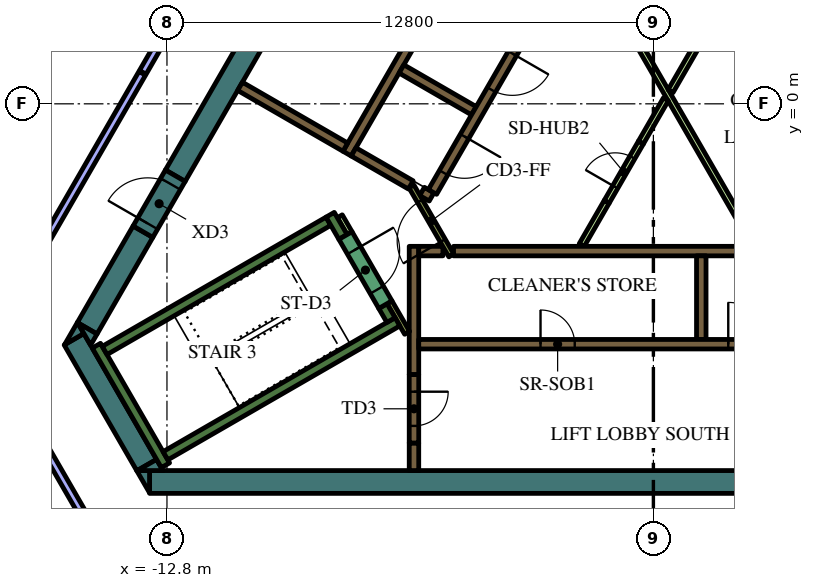
"""IFC4 building model, lengths in metres.
Left out: names, types, materials, properties, quantities, classifications, styles, units other than length and angle.
Written with IfcOpenShell. Run it as: python <this file> out.ifc"""

import sys

from ifc_helpers import new_model, si_unit, direction, frame, frame_2d, origin, place, context, subcontext, project, spatial, polyline, rectangle, outline, extrude, element, fill, save


model = new_model("IFC4")
c1 = context("Model", 3, precision=1e-05, world=origin(), true_north=direction((0.0, 1.0)))
c2 = subcontext(c1, "Body", "Model", "MODEL_VIEW")
j1 = project(units=[si_unit("LENGTHUNIT", "METRE"), si_unit("PLANEANGLEUNIT", "RADIAN")], contexts=[c1])
p1 = place(None, origin())
s1 = spatial("IfcSite", under=j1, at=p1, CompositionType="ELEMENT")
p2 = place(p1, origin())
s2 = spatial("IfcBuilding", under=s1, at=p2, CompositionType="ELEMENT")
p3 = place(p2, frame((0.0, 0.0, 275.4)))
s3 = spatial("IfcBuildingStorey", under=s2, at=p3, CompositionType="ELEMENT", Elevation=275.4)
p4 = place(p3, frame((8.904, -9.95, 0.0), z_axis=(0.0, 0.0, 1.0), x_axis=(-1.0, 0.0, 0.0)))
e1 = element("IfcWall", 1, at=p4, inside=s3, PredefinedType="SOLIDWALL", context=c2, shape_type="SweptSolid", body=[
    extrude(rectangle(XDim=22.161, YDim=0.6, at=frame_2d((11.081, 0.0))), origin(), (0.0, 0.0, 1.0), 4.2),
])
p5 = place(p3, origin())
e2 = element("IfcWall", 2, at=p5, inside=s3, PredefinedType="SOLIDWALL", context=c2, shape_type="SweptSolid", body=[
    extrude(outline(polyline([(-13.597, -9.65), (-13.259, -9.65), (-13.259, -10.236), (-13.597, -9.65)])), origin(), (0.0, 0.0, 1.0), 4.2),
])
p6 = place(p3, frame((-13.333, -9.506, 0.0), z_axis=(0.0, 0.0, 1.0), x_axis=(-0.500019073792, 0.866014391245, 0.0)))
e3 = element("IfcWall", 3, at=p6, inside=s3, PredefinedType="SOLIDWALL", context=c2, shape_type="SweptSolid", body=[
    extrude(rectangle(XDim=3.823, YDim=0.6, at=frame_2d((1.912, 0.0))), origin(), (0.0, 0.0, 1.0), 4.2),
])
e4 = element("IfcWall", 4, at=p5, inside=s3, PredefinedType="SOLIDWALL", context=c2, shape_type="SweptSolid", body=[
    extrude(outline(polyline([(-14.987, -6.043), (-15.493, -6.335), (-15.156, -5.75), (-14.987, -6.043)])), origin(), (0.0, 0.0, 1.0), 4.2),
])
e5 = element("IfcWall", 5, at=p5, inside=s3, PredefinedType="SOLIDWALL", context=c2, shape_type="SweptSolid", body=[
    extrude(outline(polyline([(-12.904, -9.65), (-13.58, -9.65), (-13.073, -9.357), (-12.904, -9.65)])), origin(), (0.0, 0.0, 1.0), 4.2),
])
p7 = place(p3, frame((-13.432, -3.364, 0.0), z_axis=(0.0, 0.0, 1.0), x_axis=(-0.499960127962, -0.866048422692, 0.0)))
e6 = element("IfcWall", 6, at=p7, inside=s3, PredefinedType="SOLIDWALL", context=c2, shape_type="SweptSolid", body=[
    extrude(rectangle(XDim=2.934, YDim=0.6, at=frame_2d((1.467, 0.0))), origin(), (0.0, 0.0, 1.0), 4.2),
])
e7 = element("IfcWall", 7, at=p5, inside=s3, PredefinedType="SOLIDWALL", context=c2, shape_type="SweptSolid", body=[
    extrude(outline(polyline([(-14.809, -6.35), (-15.147, -5.764), (-14.64, -6.057), (-14.809, -6.35)])), origin(), (0.0, 0.0, 1.0), 4.2),
])
p8 = place(p3, frame((-4.234, 12.566, 0.0), z_axis=(0.0, 0.0, 1.0), x_axis=(-0.499998841866, -0.866026072432, 0.0)))
e8 = element("IfcWall", 8, at=p8, inside=s3, PredefinedType="SOLIDWALL", context=c2, shape_type="SweptSolid", body=[
    extrude(rectangle(XDim=16.694, YDim=0.6, at=frame_2d((8.347, 0.0))), origin(), (0.0, 0.0, 1.0), 4.2),
])
p9 = place(p3, frame((-12.84, -9.511, 0.0), z_axis=(0.0, 0.0, 1.0), x_axis=(-0.499997733992, 0.866026712061, 0.0)))
e9 = element("IfcWall", 9, at=p9, inside=s3, PredefinedType="SOLIDWALL", context=c2, shape_type="SweptSolid", body=[
    extrude(rectangle(XDim=3.634, YDim=0.25, at=frame_2d((1.817, 0.0))), origin(), (0.0, 0.0, 1.0), 4.2),
])
p10 = place(p3, frame((-14.44, -6.49, 0.0), z_axis=(0.0, 0.0, 1.0), x_axis=(0.866022966069, 0.500004222222, 0.0)))
e10 = element("IfcWall", 10, at=p10, inside=s3, PredefinedType="SOLIDWALL", context=c2, shape_type="SweptSolid", body=[
    extrude(rectangle(XDim=6.8, YDim=0.25, at=frame_2d((3.4, 0.0))), origin(), (0.0, 0.0, 1.0), 4.2),
])
p11 = place(p3, frame((-8.168, -3.503, 0.0), z_axis=(0.0, 0.0, 1.0), x_axis=(-0.499952099219, 0.866053057547, 0.0)))
e11 = element("IfcWall", 11, at=p11, inside=s3, PredefinedType="SOLIDWALL", context=c2, shape_type="SweptSolid", body=[
    extrude(rectangle(XDim=0.675, YDim=0.25, at=frame_2d((0.337, 0.0))), origin(), (0.0, 0.0, 1.0), 4.2),
])
p12 = place(p3, frame((-12.84, -9.261, 0.0), z_axis=(0.0, 0.0, 1.0), x_axis=(0.866016039709, 0.500016218704, 0.0)))
e12 = element("IfcWall", 12, at=p12, inside=s3, PredefinedType="SOLIDWALL", context=c2, shape_type="SweptSolid", body=[
    extrude(rectangle(XDim=7.05, YDim=0.25, at=frame_2d((3.525, 0.0))), origin(), (0.0, 0.0, 1.0), 4.2),
])
p13 = place(p3, frame((-6.905, -5.69, 0.0), z_axis=(0.0, 0.0, 1.0), x_axis=(-0.500402024738, 0.865793170242, 0.0)))
e13 = element("IfcWall", 13, at=p13, inside=s3, PredefinedType="SOLIDWALL", context=c2, shape_type="SweptSolid", body=[
    extrude(rectangle(XDim=0.425, YDim=0.25, at=frame_2d((0.212, 0.0))), origin(), (0.0, 0.0, 1.0), 4.2),
])
p14 = place(p3, frame((-5.259, -3.875, 0.0), z_axis=(0.0, 0.0, 1.0), x_axis=(1.0, 0.0, 0.0)))
e14 = element("IfcWall", 14, at=p14, inside=s3, PredefinedType="SOLIDWALL", context=c2, shape_type="SweptSolid", body=[
    extrude(rectangle(XDim=10.489, YDim=0.25, at=frame_2d((5.244, 0.0))), origin(), (0.0, 0.0, 1.0), 4.2),
])
p15 = place(p3, frame((1.26, -4.0, 0.0), z_axis=(0.0, 0.0, 1.0), x_axis=(0.0, -1.0, 0.0)))
e15 = element("IfcWall", 15, at=p15, inside=s3, PredefinedType="SOLIDWALL", context=c2, shape_type="SweptSolid", body=[
    extrude(rectangle(XDim=2.2, YDim=0.25, at=frame_2d((1.1, 0.0))), origin(), (0.0, 0.0, 1.0), 4.2),
])
p16 = place(p3, frame((-6.3, -7.125, 0.0), z_axis=(0.0, 0.0, 1.0), x_axis=(0.0, 1.0, 0.0)))
e16 = element("IfcWall", 16, at=p16, inside=s3, PredefinedType="SOLIDWALL", context=c2, shape_type="SweptSolid", body=[
    extrude(rectangle(XDim=3.375, YDim=0.25, at=frame_2d((1.687, 0.0))), origin(), (0.0, 0.0, 1.0), 4.2),
])
p17 = place(p3, frame((-6.175, -3.875, 0.0), z_axis=(0.0, 0.0, 1.0), x_axis=(1.0, 0.0, 0.0)))
e17 = element("IfcWall", 17, at=p17, inside=s3, PredefinedType="SOLIDWALL", context=c2, shape_type="SweptSolid", body=[
    extrude(rectangle(XDim=0.637, YDim=0.25, at=frame_2d((0.318, 0.0))), origin(), (0.0, 0.0, 1.0), 4.2),
])
p18 = place(p3, frame((-6.3, -8.925, 0.0), z_axis=(0.0, 0.0, 1.0), x_axis=(0.0, -1.0, 0.0)))
e18 = element("IfcWall", 18, at=p18, inside=s3, PredefinedType="SOLIDWALL", context=c2, shape_type="SweptSolid", body=[
    extrude(rectangle(XDim=0.725, YDim=0.25, at=frame_2d((0.363, 0.0))), origin(), (0.0, 0.0, 1.0), 4.2),
])
p19 = place(p3, frame((5.97, -2.591, 0.0), z_axis=(0.0, 0.0, 1.0), x_axis=(-0.499994469932, 0.866028596547, 0.0)))
e19 = element("IfcWall", 19, at=p19, inside=s3, PredefinedType="SOLIDWALL", context=c2, shape_type="SweptSolid", body=[
    extrude(rectangle(XDim=10.488, YDim=0.25, at=frame_2d((5.244, 0.0))), origin(), (0.0, 0.0, 1.0), 4.2),
])
p20 = place(p3, frame((-3.02, 7.419, 0.0), z_axis=(0.0, 0.0, 1.0), x_axis=(-0.500022956343, -0.866012149528, 0.0)))
e20 = element("IfcWall", 20, at=p20, inside=s3, PredefinedType="SOLIDWALL", context=c2, shape_type="SweptSolid", body=[
    extrude(rectangle(XDim=10.08, YDim=0.25, at=frame_2d((5.04, 0.0))), origin(), (0.0, 0.0, 1.0), 4.2),
])
p21 = place(p3, frame((-4.724, -0.182, 0.0), z_axis=(0.0, 0.0, 1.0), x_axis=(-0.866008176907, 0.50002983664, 0.0)))
e21 = element("IfcWall", 21, at=p21, inside=s3, PredefinedType="SOLIDWALL", context=c2, shape_type="SweptSolid", body=[
    extrude(rectangle(XDim=2.2, YDim=0.25, at=frame_2d((1.1, 0.0))), origin(), (0.0, 0.0, 1.0), 4.2),
])
p22 = place(p3, frame((-6.088, -2.305, 0.0), z_axis=(0.0, 0.0, 1.0), x_axis=(0.866059450854, -0.499941024108, 0.0)))
e22 = element("IfcWall", 22, at=p22, inside=s3, PredefinedType="SOLIDWALL", context=c2, shape_type="SweptSolid", body=[
    extrude(rectangle(XDim=0.29, YDim=0.25, at=frame_2d((0.145, 0.0))), origin(), (0.0, 0.0, 1.0), 4.2),
])
p23 = place(p3, frame((-7.889, -1.265, 0.0), z_axis=(0.0, 0.0, 1.0), x_axis=(0.865986741702, -0.500066958712, 0.0)))
e23 = element("IfcWall", 23, at=p23, inside=s3, PredefinedType="SOLIDWALL", context=c2, shape_type="SweptSolid", body=[
    extrude(rectangle(XDim=1.738, YDim=0.25, at=frame_2d((0.869, 0.0))), origin(), (0.0, 0.0, 1.0), 4.2),
])
p24 = place(p3, frame((-8.106, -1.14, 0.0), z_axis=(0.0, 0.0, 1.0), x_axis=(-0.866008981251, 0.500028443584, 0.0)))
e24 = element("IfcWall", 24, at=p24, inside=s3, PredefinedType="SOLIDWALL", context=c2, shape_type="SweptSolid", body=[
    extrude(rectangle(XDim=3.2, YDim=0.25, at=frame_2d((1.6, 0.0))), origin(), (0.0, 0.0, 1.0), 4.2),
])
p25 = place(p3, frame((-8.252, -2.958, 0.0), z_axis=(0.0, 0.0, 1.0), x_axis=(0.500174715838, -0.865924508047, 0.0)))
e25 = element("IfcWall", 25, at=p25, inside=s3, PredefinedType="PARTITIONING", context=c2, shape_type="SweptSolid", body=[
    extrude(rectangle(XDim=0.514, YDim=0.15, at=frame_2d((0.257, 0.0))), origin(), (0.0, 0.0, 1.0), 3.55),
])
p26 = place(p3, frame((-6.48, -6.027, 0.0), z_axis=(0.0, 0.0, 1.0), x_axis=(-0.499927229454, 0.866067413802, 0.0)))
e26 = element("IfcWall", 26, at=p26, inside=s3, PredefinedType="PARTITIONING", context=c2, shape_type="SweptSolid", body=[
    extrude(rectangle(XDim=0.929, YDim=0.15, at=frame_2d((0.464, 0.0))), origin(), (0.0, 0.0, 1.0), 4.2),
])
p27 = place(p3, frame((-1.887, 4.168, 0.0), z_axis=(0.0, 0.0, 1.0), x_axis=(0.499997069472, -0.866027095719, 0.0)))
e27 = element("IfcWall", 27, at=p27, inside=s3, PredefinedType="PARTITIONING", context=c2, shape_type="SweptSolid", body=[
    extrude(rectangle(XDim=9.106, YDim=0.15, at=frame_2d((4.553, 0.0))), origin(), (0.0, 0.0, 1.0), 3.55),
])
p28 = place(p3, frame((-0.329, -1.021, 0.0), z_axis=(0.0, 0.0, 1.0), x_axis=(0.500033191285, 0.866006239939, 0.0)))
e28 = element("IfcWall", 28, at=p28, inside=s3, PredefinedType="PARTITIONING", context=c2, shape_type="SweptSolid", body=[
    extrude(rectangle(XDim=1.315, YDim=0.15, at=frame_2d((0.657, 0.0))), origin(), (0.0, 0.0, 1.0), 3.55),
])
p29 = place(p3, frame((2.277, 3.493, 0.0), z_axis=(0.0, 0.0, 1.0), x_axis=(-0.499994550825, -0.866028549844, 0.0)))
e29 = element("IfcWall", 29, at=p29, inside=s3, PredefinedType="PARTITIONING", context=c2, shape_type="SweptSolid", body=[
    extrude(rectangle(XDim=3.65, YDim=0.15, at=frame_2d((1.825, 0.0))), origin(), (0.0, 0.0, 1.0), 3.55),
])
p30 = place(p3, frame((-1.887, -3.718, 0.0), z_axis=(0.0, 0.0, 1.0), x_axis=(0.500033191285, 0.866006239939, 0.0)))
e30 = element("IfcWall", 30, at=p30, inside=s3, PredefinedType="PARTITIONING", context=c2, shape_type="SweptSolid", body=[
    extrude(rectangle(XDim=1.315, YDim=0.15, at=frame_2d((0.657, 0.0))), origin(), (0.0, 0.0, 1.0), 3.55),
])
p31 = place(p3, frame((-6.175, -6.325, 0.0), z_axis=(0.0, 0.0, 1.0), x_axis=(1.0, 0.0, 0.0)))
e31 = element("IfcWall", 31, at=p31, inside=s3, PredefinedType="SOLIDWALL", context=c2, shape_type="SweptSolid", body=[
    extrude(rectangle(XDim=12.35, YDim=0.25, at=frame_2d((6.175, 0.0))), origin(), (0.0, 0.0, 1.0), 4.2),
])
p32 = place(p31, frame((3.205, 0.0, 0.0)))
e32 = element("IfcOpeningElement", 32, at=p32, cuts=e31, PredefinedType="OPENING", context=c2, shape_type="SweptSolid", body=[
    extrude(rectangle(XDim=0.9, YDim=2.1, at=frame_2d((0.45, 1.05))), frame((0.0, 0.135, 0.0), z_axis=(0.0, -1.0, 0.0), x_axis=(1.0, 0.0, 0.0)), (0.0, 0.0, 1.0), 0.27),
])
p33 = place(p31, frame((8.145, 0.0, 0.0)))
e33 = element("IfcOpeningElement", 33, at=p33, cuts=e31, PredefinedType="OPENING", context=c2, shape_type="SweptSolid", body=[
    extrude(rectangle(XDim=1.1, YDim=2.1, at=frame_2d((0.55, 1.05))), frame((0.0, 0.135, 0.0), z_axis=(0.0, -1.0, 0.0), x_axis=(1.0, 0.0, 0.0)), (0.0, 0.0, 1.0), 0.27),
])
p34 = place(p31, frame((10.665, 0.0, 0.0)))
e34 = element("IfcOpeningElement", 34, at=p34, cuts=e31, PredefinedType="OPENING", context=c2, shape_type="SweptSolid", body=[
    extrude(rectangle(XDim=1.1, YDim=2.1, at=frame_2d((0.55, 1.05))), frame((0.0, 0.135, 0.0), z_axis=(0.0, -1.0, 0.0), x_axis=(1.0, 0.0, 0.0)), (0.0, 0.0, 1.0), 0.27),
])
p35 = place(p3, frame((-0.898, 6.194, 0.0), z_axis=(0.0, 0.0, 1.0), x_axis=(-0.499996202215, -0.866027596426, 0.0)))
e35 = element("IfcWall", 35, at=p35, inside=s3, PredefinedType="SOLIDWALL", context=c2, shape_type="SweptSolid", body=[
    extrude(rectangle(XDim=9.83, YDim=0.25, at=frame_2d((4.915, 0.0))), origin(), (0.0, 0.0, 1.0), 4.2),
])
p36 = place(p35, frame((0.585, 0.0, 0.0)))
e36 = element("IfcOpeningElement", 36, at=p36, cuts=e35, PredefinedType="OPENING", context=c2, shape_type="SweptSolid", body=[
    extrude(rectangle(XDim=1.1, YDim=2.1, at=frame_2d((0.55, 1.05))), frame((0.0, 0.135, 0.0), z_axis=(0.0, -1.0, 0.0), x_axis=(1.0, 0.0, 0.0)), (0.0, 0.0, 1.0), 0.27),
])
p37 = place(p35, frame((3.105, 0.0, 0.0)))
e37 = element("IfcOpeningElement", 37, at=p37, cuts=e35, PredefinedType="OPENING", context=c2, shape_type="SweptSolid", body=[
    extrude(rectangle(XDim=1.1, YDim=2.1, at=frame_2d((0.55, 1.05))), frame((0.0, 0.135, 0.0), z_axis=(0.0, -1.0, 0.0), x_axis=(1.0, 0.0, 0.0)), (0.0, 0.0, 1.0), 0.27),
])
p38 = place(p35, frame((5.625, 0.0, 0.0)))
e38 = element("IfcOpeningElement", 38, at=p38, cuts=e35, PredefinedType="OPENING", context=c2, shape_type="SweptSolid", body=[
    extrude(rectangle(XDim=1.1, YDim=2.1, at=frame_2d((0.55, 1.05))), frame((0.0, 0.135, 0.0), z_axis=(0.0, -1.0, 0.0), x_axis=(1.0, 0.0, 0.0)), (0.0, 0.0, 1.0), 0.27),
])
p39 = place(p35, frame((8.145, 0.0, 0.0)))
e39 = element("IfcOpeningElement", 39, at=p39, cuts=e35, PredefinedType="OPENING", context=c2, shape_type="SweptSolid", body=[
    extrude(rectangle(XDim=1.1, YDim=2.1, at=frame_2d((0.55, 1.05))), frame((0.0, 0.135, 0.0), z_axis=(0.0, -1.0, 0.0), x_axis=(1.0, 0.0, 0.0)), (0.0, 0.0, 1.0), 0.27),
])
p40 = place(p3, frame((-8.103, -3.466, 0.0), z_axis=(0.0, 0.0, 1.0), x_axis=(0.500078061341, -0.865980330357, 0.0)))
e40 = element("IfcWall", 40, at=p40, inside=s3, PredefinedType="SOLIDWALL", context=c2, shape_type="SweptSolid", body=[
    extrude(rectangle(XDim=2.1, YDim=0.4, at=frame_2d((1.05, 0.0))), origin(), (0.0, 0.0, 1.0), 4.2),
])
p41 = place(p40, frame((0.45, 0.0, 0.0)))
e41 = element("IfcOpeningElement", 41, at=p41, cuts=e40, PredefinedType="OPENING", context=c2, shape_type="SweptSolid", body=[
    extrude(rectangle(XDim=1.2, YDim=2.1, at=frame_2d((0.6, 1.05))), frame((0.0, 0.21, 0.0), z_axis=(0.0, -1.0, 0.0), x_axis=(1.0, 0.0, 0.0)), (0.0, 0.0, 1.0), 0.42),
])
p42 = place(p3, frame((-6.3, -7.125, 0.0), z_axis=(0.0, 0.0, 1.0), x_axis=(0.0, -1.0, 0.0)))
e42 = element("IfcWall", 42, at=p42, inside=s3, PredefinedType="SOLIDWALL", context=c2, shape_type="SweptSolid", body=[
    extrude(rectangle(XDim=1.8, YDim=0.25, at=frame_2d((0.9, 0.0))), origin(), (0.0, 0.0, 1.0), 4.2),
])
p43 = place(p42, frame((0.45, 0.0, 0.0)))
e43 = element("IfcOpeningElement", 43, at=p43, cuts=e42, PredefinedType="OPENING", context=c2, shape_type="SweptSolid", body=[
    extrude(rectangle(XDim=0.9, YDim=2.1, at=frame_2d((0.45, 1.05))), frame((0.0, 0.135, 0.0), z_axis=(0.0, -1.0, 0.0), x_axis=(1.0, 0.0, 0.0)), (0.0, 0.0, 1.0), 0.27),
])
p44 = place(p3, frame((-5.317, -3.99, 0.0), z_axis=(0.0, 0.0, 1.0), x_axis=(-0.500027713859, 0.866009402589, 0.0)))
e44 = element("IfcWall", 44, at=p44, inside=s3, PredefinedType="PARTITIONING", context=c2, shape_type="SweptSolid", body=[
    extrude(rectangle(XDim=2.1, YDim=0.15, at=frame_2d((1.05, 0.0))), origin(), (0.0, 0.0, 1.0), 4.2),
])
p45 = place(p44, frame((0.45, 0.0, 0.0)))
e45 = element("IfcOpeningElement", 45, at=p45, cuts=e44, PredefinedType="OPENING", context=c2, shape_type="SweptSolid", body=[
    extrude(rectangle(XDim=1.2, YDim=2.1, at=frame_2d((0.6, 1.05))), frame((0.0, 0.085, 0.0), z_axis=(0.0, -1.0, 0.0), x_axis=(1.0, 0.0, 0.0)), (0.0, 0.0, 1.0), 0.17),
])
p46 = place(p3, frame((-13.432, -3.364, 0.0), z_axis=(0.0, 0.0, 1.0), x_axis=(0.500000056704, 0.866025371046, 0.0)))
e46 = element("IfcWall", 46, at=p46, inside=s3, PredefinedType="SOLIDWALL", context=c2, shape_type="SweptSolid", body=[
    extrude(rectangle(XDim=1.7, YDim=0.6, at=frame_2d((0.85, 0.0))), origin(), (0.0, 0.0, 1.0), 4.2),
])
p47 = place(p46, frame((0.25, 0.0, 0.0)))
e47 = element("IfcOpeningElement", 47, at=p47, cuts=e46, PredefinedType="OPENING", context=c2, shape_type="SweptSolid", body=[
    extrude(rectangle(XDim=1.2, YDim=2.1, at=frame_2d((0.6, 1.05))), frame((0.0, 0.31, 0.0), z_axis=(0.0, -1.0, 0.0), x_axis=(1.0, 0.0, 0.0)), (0.0, 0.0, 1.0), 0.62),
])
p48 = place(p3, frame((-1.229, -2.579, 0.0), z_axis=(0.0, 0.0, 1.0), x_axis=(0.500062916607, 0.865989075817, 0.0)))
e48 = element("IfcWall", 48, at=p48, inside=s3, PredefinedType="PARTITIONING", context=c2, shape_type="SweptSolid", body=[
    extrude(rectangle(XDim=1.8, YDim=0.15, at=frame_2d((0.9, 0.0))), origin(), (0.0, 0.0, 1.0), 3.55),
])
p49 = place(p48, frame((0.45, 0.0, 0.0)))
e49 = element("IfcOpeningElement", 49, at=p49, cuts=e48, PredefinedType="OPENING", context=c2, shape_type="SweptSolid", body=[
    extrude(rectangle(XDim=0.9, YDim=2.1, at=frame_2d((0.45, 1.05))), frame((0.0, 0.085, 0.0), z_axis=(0.0, -1.0, 0.0), x_axis=(1.0, 0.0, 0.0)), (0.0, 0.0, 1.0), 0.17),
])
p50 = place(p3, frame((-17.497, -0.613, 0.0), z_axis=(0.0, 0.0, 1.0), x_axis=(0.447474899467, 0.894296491297, 0.0)))
e50 = element("IfcWall", 50, at=p50, inside=s3, PredefinedType="PARTITIONING", context=c2, shape_type="SweptSolid", body=[
    extrude(rectangle(XDim=5.979, YDim=0.15, at=frame_2d((2.99, 0.0))), origin(), (0.0, 0.0, 1.0), 3.55),
])
p51 = place(p50, frame((2.58, 0.0, 0.0)))
e51 = element("IfcOpeningElement", 51, at=p51, cuts=e50, PredefinedType="OPENING", context=c2, shape_type="SweptSolid", body=[
    extrude(rectangle(XDim=0.9, YDim=2.1, at=frame_2d((0.45, 1.05))), frame((0.0, 0.085, 0.0), z_axis=(0.0, -1.0, 0.0), x_axis=(1.0, 0.0, 0.0)), (0.0, 0.0, 1.0), 0.17),
])
p52 = place(p3, frame((-7.436, 11.221, 0.0), z_axis=(0.0, 0.0, 1.0), x_axis=(-0.49999894854, -0.866026010844, 0.0)))
e52 = element("IfcWall", 52, at=p52, inside=s3, PredefinedType="PARTITIONING", context=c2, shape_type="SweptSolid", body=[
    extrude(rectangle(XDim=12.0, YDim=0.2, at=frame_2d((6.0, 0.0))), origin(), (0.0, 0.0, 1.0), 3.55),
])
p53 = place(p52, frame((5.5, 0.0, 0.0)))
e53 = element("IfcOpeningElement", 53, at=p53, cuts=e52, PredefinedType="OPENING", context=c2, shape_type="SweptSolid", body=[
    extrude(rectangle(XDim=1.0, YDim=2.1, at=frame_2d((0.5, 1.05))), frame((0.0, 0.11, 0.0), z_axis=(0.0, -1.0, 0.0), x_axis=(1.0, 0.0, 0.0)), (0.0, 0.0, 1.0), 0.22),
])
p54 = place(p3, frame((-13.451, 0.803, 0.0), z_axis=(0.0, 0.0, 1.0), x_axis=(-0.499982585408, -0.86603545787, 0.0)))
e54 = element("IfcWall", 54, at=p54, inside=s3, PredefinedType="PARTITIONING", context=c2, shape_type="SweptSolid", body=[
    extrude(rectangle(XDim=8.26, YDim=0.2, at=frame_2d((4.13, 0.0))), origin(), (0.0, 0.0, 1.0), 3.55),
])
p55 = place(p3, frame((-17.218, -6.978, 0.0), z_axis=(0.0, 0.0, 1.0), x_axis=(0.500012299885, -0.866018302326, 0.0)))
e55 = element("IfcWall", 55, at=p55, inside=s3, PredefinedType="PARTITIONING", context=c2, shape_type="SweptSolid", body=[
    extrude(rectangle(XDim=5.857, YDim=0.2, at=frame_2d((2.929, 0.0))), origin(), (0.0, 0.0, 1.0), 3.55),
])
p56 = place(p32, origin())
e56 = element("IfcDoor", 56, at=p56, inside=s3, OperationType="SINGLE_SWING_LEFT", PredefinedType="DOOR", context=c2, shape_type="SweptSolid", body=[
    extrude(rectangle(XDim=0.9, YDim=2.1, at=frame_2d((0.45, 1.05))), frame((0.0, 0.025, 0.0), z_axis=(0.0, -1.0, 0.0), x_axis=(1.0, 0.0, 0.0)), (0.0, 0.0, 1.0), 0.05),
])
fill(e32, e56)
p57 = place(p33, origin())
e57 = element("IfcDoor", 57, at=p57, inside=s3, OperationType="DOUBLE_DOOR_SLIDING", PredefinedType="DOOR", context=c2, shape_type="SweptSolid", body=[
    extrude(rectangle(XDim=1.1, YDim=2.1, at=frame_2d((0.55, 1.05))), frame((0.0, 0.025, 0.0), z_axis=(0.0, -1.0, 0.0), x_axis=(1.0, 0.0, 0.0)), (0.0, 0.0, 1.0), 0.05),
])
fill(e33, e57)
p58 = place(p38, origin())
e58 = element("IfcDoor", 58, at=p58, inside=s3, OperationType="DOUBLE_DOOR_SLIDING", PredefinedType="DOOR", context=c2, shape_type="SweptSolid", body=[
    extrude(rectangle(XDim=1.1, YDim=2.1, at=frame_2d((0.55, 1.05))), frame((0.0, 0.025, 0.0), z_axis=(0.0, -1.0, 0.0), x_axis=(1.0, 0.0, 0.0)), (0.0, 0.0, 1.0), 0.05),
])
fill(e38, e58)
p59 = place(p39, origin())
e59 = element("IfcDoor", 59, at=p59, inside=s3, OperationType="DOUBLE_DOOR_SLIDING", PredefinedType="DOOR", context=c2, shape_type="SweptSolid", body=[
    extrude(rectangle(XDim=1.1, YDim=2.1, at=frame_2d((0.55, 1.05))), frame((0.0, 0.025, 0.0), z_axis=(0.0, -1.0, 0.0), x_axis=(1.0, 0.0, 0.0)), (0.0, 0.0, 1.0), 0.05),
])
fill(e39, e59)
p60 = place(p41, origin())
e60 = element("IfcDoor", 60, at=p60, inside=s3, OperationType="SINGLE_SWING_LEFT", PredefinedType="DOOR", context=c2, shape_type="SweptSolid", body=[
    extrude(rectangle(XDim=1.2, YDim=2.1, at=frame_2d((0.6, 1.05))), frame((0.0, 0.025, 0.0), z_axis=(0.0, -1.0, 0.0), x_axis=(1.0, 0.0, 0.0)), (0.0, 0.0, 1.0), 0.05),
])
fill(e41, e60)
p61 = place(p43, origin())
e61 = element("IfcDoor", 61, at=p61, inside=s3, OperationType="SINGLE_SWING_LEFT", PredefinedType="DOOR", context=c2, shape_type="SweptSolid", body=[
    extrude(rectangle(XDim=0.9, YDim=2.1, at=frame_2d((0.45, 1.05))), frame((0.0, 0.025, 0.0), z_axis=(0.0, -1.0, 0.0), x_axis=(1.0, 0.0, 0.0)), (0.0, 0.0, 1.0), 0.05),
])
fill(e43, e61)
p62 = place(p45, origin())
e62 = element("IfcDoor", 62, at=p62, inside=s3, OperationType="SINGLE_SWING_LEFT", PredefinedType="DOOR", context=c2, shape_type="SweptSolid", body=[
    extrude(rectangle(XDim=1.2, YDim=2.1, at=frame_2d((0.6, 1.05))), frame((0.0, 0.025, 0.0), z_axis=(0.0, -1.0, 0.0), x_axis=(1.0, 0.0, 0.0)), (0.0, 0.0, 1.0), 0.05),
])
fill(e45, e62)
p63 = place(p47, origin())
e63 = element("IfcDoor", 63, at=p63, inside=s3, OperationType="SINGLE_SWING_LEFT", PredefinedType="DOOR", context=c2, shape_type="SweptSolid", body=[
    extrude(rectangle(XDim=1.2, YDim=2.1, at=frame_2d((0.6, 1.05))), frame((0.0, 0.025, 0.0), z_axis=(0.0, -1.0, 0.0), x_axis=(1.0, 0.0, 0.0)), (0.0, 0.0, 1.0), 0.05),
])
fill(e47, e63)
p64 = place(p49, origin())
e64 = element("IfcDoor", 64, at=p64, inside=s3, OperationType="SINGLE_SWING_LEFT", PredefinedType="DOOR", context=c2, shape_type="SweptSolid", body=[
    extrude(rectangle(XDim=0.9, YDim=2.1, at=frame_2d((0.45, 1.05))), frame((0.0, 0.025, 0.0), z_axis=(0.0, -1.0, 0.0), x_axis=(1.0, 0.0, 0.0)), (0.0, 0.0, 1.0), 0.05),
])
fill(e49, e64)
save(model, sys.argv[1])
